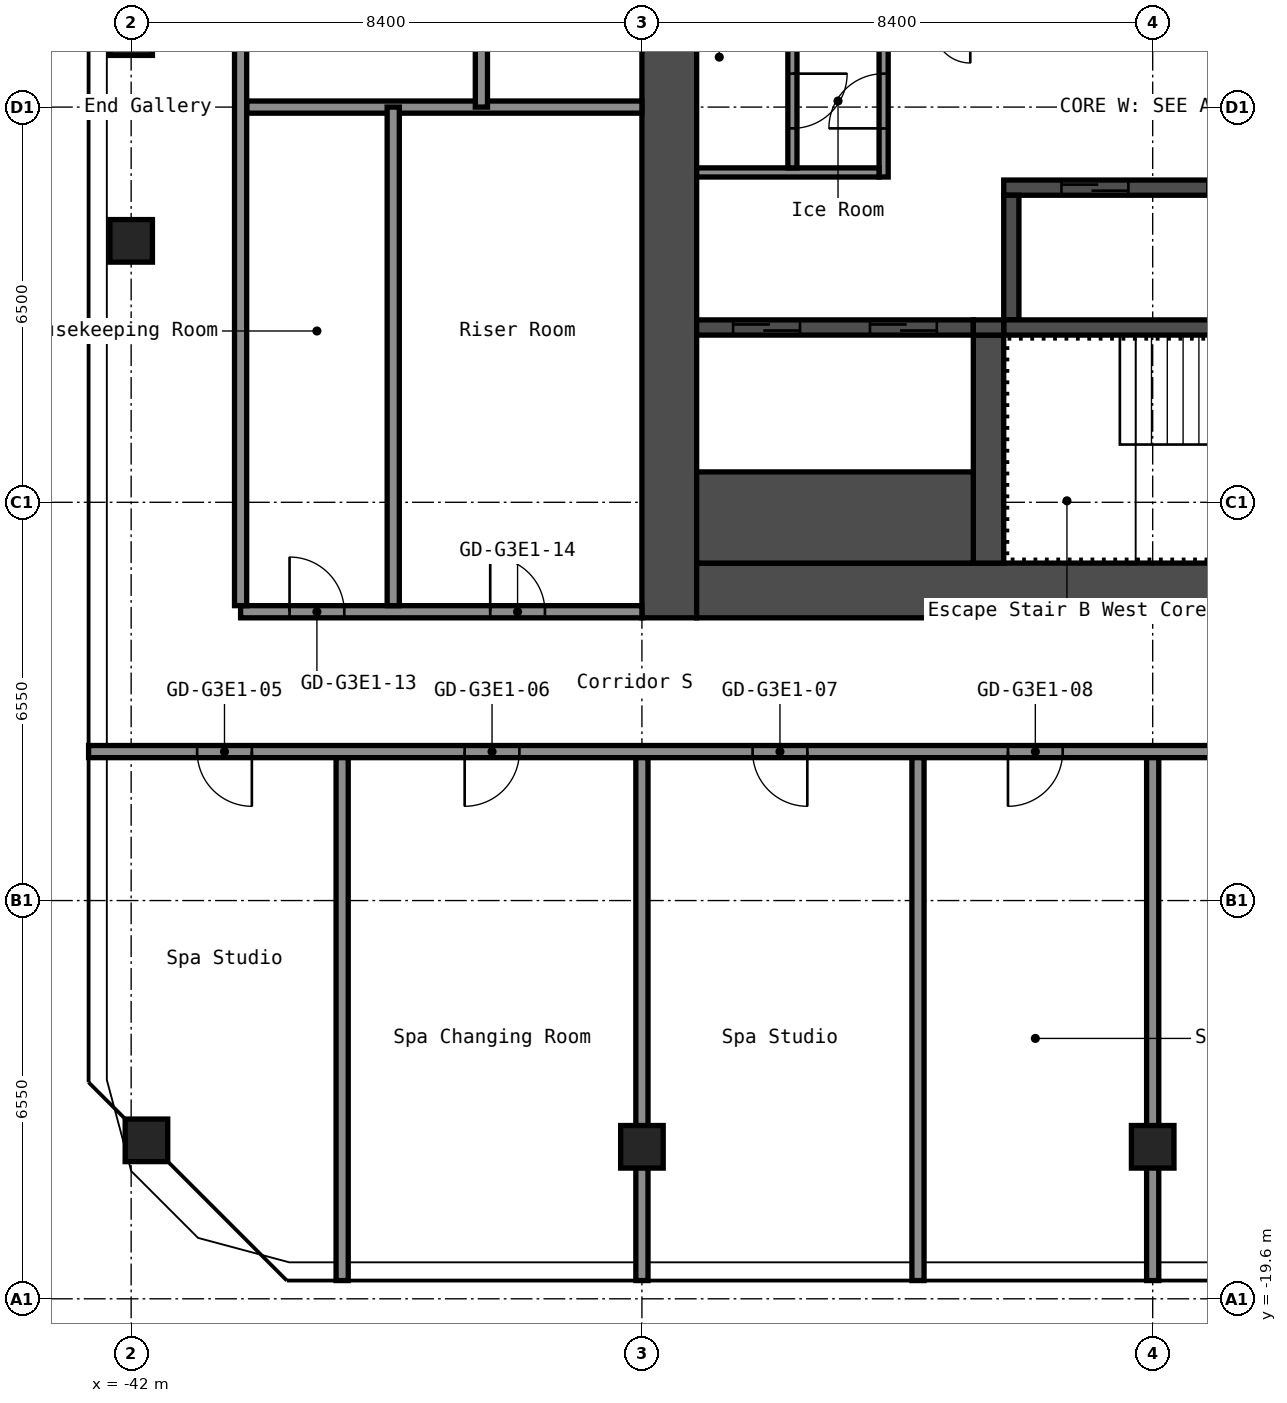
"""IFC4 building model, lengths in metres.
Left out: names, types, materials, properties, quantities, classifications, styles, units other than length and angle.
Written with IfcOpenShell. Run it as: python <this file> out.ifc"""

import sys

from ifc_helpers import new_model, si_unit, direction, frame, frame_2d, origin, origin_2d, place, context, subcontext, project, spatial, rectangle, hollow_rectangle, extrude, element, fill, save


model = new_model("IFC4")
c1 = context("Model", 3, precision=1e-05, world=origin(), true_north=direction((0.0, 1.0)))
c2 = subcontext(c1, "Body", "Model", "MODEL_VIEW")
j1 = project(units=[si_unit("LENGTHUNIT", "METRE"), si_unit("PLANEANGLEUNIT", "RADIAN")], contexts=[c1])
p1 = place(None, origin())
s1 = spatial("IfcSite", under=j1, at=p1, CompositionType="ELEMENT")
p2 = place(p1, origin())
s2 = spatial("IfcBuilding", under=s1, at=p2, CompositionType="ELEMENT")
p3 = place(p2, frame((0.0, 0.0, 159.8)))
s3 = spatial("IfcBuildingStorey", under=s2, at=p3, CompositionType="ELEMENT", Elevation=159.8)
for number, where, z_axis, x_axis in (
    (1, (-41.749, -16.994, 0.0), (0.0, 0.0, 1.0), (1.0, 0.0, 0.0)),
    (2, (-42.0, -2.2, 0.0), (0.0, 0.0, 1.0), (1.0, 0.0, 0.0)),
    (3, (-42.0, 1.2, 0.0), (0.0, 0.0, 1.0), (1.0, 0.0, 0.0)),
    (4, (-33.6, -17.1, 0.0), (0.0, 0.0, 1.0), (1.0, 0.0, 0.0)),
    (5, (-25.2, -17.1, 0.0), (0.0, 0.0, 1.0), (1.0, 0.0, 0.0)),
):
    element("IfcColumn", number, at=place(p3, frame(where, z_axis=z_axis, x_axis=x_axis)), inside=s3, PredefinedType="COLUMN", context=c2, shape_type="SweptSolid", body=[
        extrude(hollow_rectangle(XDim=0.7, YDim=0.7, WallThickness=0.028, at=origin_2d()), origin(), (0.0, 0.0, 1.0), 2.75),
    ])
p4 = place(p3, frame((-33.15, -8.4, 0.0), z_axis=(0.0, 0.0, 1.0), x_axis=(0.0, 1.0, 0.0)))
e6 = element("IfcWall", 6, at=p4, inside=s3, PredefinedType="SHEAR", context=c2, shape_type="SweptSolid", body=[
    extrude(rectangle(XDim=16.8, YDim=0.9, at=frame_2d((8.4, 0.0))), origin(), (0.0, 0.0, 1.0), 2.75),
])
p5 = place(p3, frame((-32.7, -7.95, 0.0), z_axis=(0.0, 0.0, 1.0), x_axis=(1.0, 0.0, 0.0)))
e7 = element("IfcWall", 7, at=p5, inside=s3, PredefinedType="SHEAR", context=c2, shape_type="SweptSolid", body=[
    extrude(rectangle(XDim=15.0, YDim=0.9, at=frame_2d((7.5, 0.0))), origin(), (0.0, 0.0, 1.0), 2.75),
])
p6 = place(p5, frame((11.45, 0.0, 0.0)))
e8 = element("IfcOpeningElement", 8, at=p6, cuts=e7, PredefinedType="OPENING", context=c2, shape_type="SweptSolid", body=[
    extrude(rectangle(XDim=1.0, YDim=2.1, at=frame_2d((0.5, 1.05))), frame((0.0, 0.46, 0.0), z_axis=(0.0, -1.0, 0.0), x_axis=(1.0, 0.0, 0.0)), (0.0, 0.0, 1.0), 0.92),
])
p7 = place(p3, frame((-27.65, -1.325, 0.0), z_axis=(0.0, 0.0, 1.0), x_axis=(1.0, 0.0, 0.0)))
e9 = element("IfcWall", 9, at=p7, inside=s3, PredefinedType="SHEAR", context=c2, shape_type="SweptSolid", body=[
    extrude(rectangle(XDim=7.5, YDim=0.25, at=frame_2d((3.75, 0.0))), origin(), (0.0, 0.0, 1.0), 2.75),
])
p8 = place(p7, frame((5.75, 0.0, 0.0)))
e10 = element("IfcOpeningElement", 10, at=p8, cuts=e9, PredefinedType="OPENING", context=c2, shape_type="SweptSolid", body=[
    extrude(rectangle(XDim=1.1, YDim=2.1, at=frame_2d((0.55, 1.05))), frame((0.0, 0.135, 0.0), z_axis=(0.0, -1.0, 0.0), x_axis=(1.0, 0.0, 0.0)), (0.0, 0.0, 1.0), 0.27),
])
p9 = place(p7, frame((3.35, 0.0, 0.0)))
e11 = element("IfcOpeningElement", 11, at=p9, cuts=e9, PredefinedType="OPENING", context=c2, shape_type="SweptSolid", body=[
    extrude(rectangle(XDim=1.1, YDim=2.1, at=frame_2d((0.55, 1.05))), frame((0.0, 0.135, 0.0), z_axis=(0.0, -1.0, 0.0), x_axis=(1.0, 0.0, 0.0)), (0.0, 0.0, 1.0), 0.27),
])
p10 = place(p7, frame((0.95, 0.0, 0.0)))
e12 = element("IfcOpeningElement", 12, at=p10, cuts=e9, PredefinedType="OPENING", context=c2, shape_type="SweptSolid", body=[
    extrude(rectangle(XDim=1.1, YDim=2.1, at=frame_2d((0.55, 1.05))), frame((0.0, 0.135, 0.0), z_axis=(0.0, -1.0, 0.0), x_axis=(1.0, 0.0, 0.0)), (0.0, 0.0, 1.0), 0.27),
])
p11 = place(p3, frame((-27.525, -3.5, 0.0), z_axis=(0.0, 0.0, 1.0), x_axis=(0.0, 1.0, 0.0)))
e13 = element("IfcWall", 13, at=p11, inside=s3, PredefinedType="SHEAR", context=c2, shape_type="SweptSolid", body=[
    extrude(rectangle(XDim=2.05, YDim=0.25, at=frame_2d((1.025, 0.0))), origin(), (0.0, 0.0, 1.0), 2.75),
])
p12 = place(p3, frame((-27.65, -3.625, 0.0), z_axis=(0.0, 0.0, 1.0), x_axis=(1.0, 0.0, 0.0)))
e14 = element("IfcWall", 14, at=p12, inside=s3, PredefinedType="SHEAR", context=c2, shape_type="SweptSolid", body=[
    extrude(rectangle(XDim=7.5, YDim=0.25, at=frame_2d((3.75, 0.0))), origin(), (0.0, 0.0, 1.0), 2.75),
])
p13 = place(p3, frame((-27.9, -7.5, 0.0), z_axis=(0.0, 0.0, 1.0), x_axis=(0.0, 1.0, 0.0)))
e15 = element("IfcWall", 15, at=p13, inside=s3, PredefinedType="SHEAR", context=c2, shape_type="SweptSolid", body=[
    extrude(rectangle(XDim=3.75, YDim=0.5, at=frame_2d((1.875, 0.0))), origin(), (0.0, 0.0, 1.0), 2.75),
])
p14 = place(p3, frame((-32.7, -3.625, 0.0), z_axis=(0.0, 0.0, 1.0), x_axis=(1.0, 0.0, 0.0)))
e16 = element("IfcWall", 16, at=p14, inside=s3, PredefinedType="SHEAR", context=c2, shape_type="SweptSolid", body=[
    extrude(rectangle(XDim=4.55, YDim=0.25, at=frame_2d((2.275, 0.0))), origin(), (0.0, 0.0, 1.0), 2.75),
])
p15 = place(p14, frame((2.85, 0.0, 0.0)))
e17 = element("IfcOpeningElement", 17, at=p15, cuts=e16, PredefinedType="OPENING", context=c2, shape_type="SweptSolid", body=[
    extrude(rectangle(XDim=1.1, YDim=2.1, at=frame_2d((0.55, 1.05))), frame((0.0, 0.135, 0.0), z_axis=(0.0, -1.0, 0.0), x_axis=(1.0, 0.0, 0.0)), (0.0, 0.0, 1.0), 0.27),
])
p16 = place(p14, frame((0.6, 0.0, 0.0)))
e18 = element("IfcOpeningElement", 18, at=p16, cuts=e16, PredefinedType="OPENING", context=c2, shape_type="SweptSolid", body=[
    extrude(rectangle(XDim=1.1, YDim=2.1, at=frame_2d((0.55, 1.05))), frame((0.0, 0.135, 0.0), z_axis=(0.0, -1.0, 0.0), x_axis=(1.0, 0.0, 0.0)), (0.0, 0.0, 1.0), 0.27),
])
p17 = place(p3, frame((-32.7, -6.75, 0.0), z_axis=(0.0, 0.0, 1.0), x_axis=(1.0, 0.0, 0.0)))
e19 = element("IfcWall", 19, at=p17, inside=s3, PredefinedType="SHEAR", context=c2, shape_type="SweptSolid", body=[
    extrude(rectangle(XDim=4.55, YDim=1.5, at=frame_2d((2.275, 0.0))), origin(), (0.0, 0.0, 1.0), 2.75),
])
p18 = place(p3, frame((-28.15, -3.625, 0.0), z_axis=(0.0, 0.0, 1.0), x_axis=(1.0, 0.0, 0.0)))
e20 = element("IfcWall", 20, at=p18, inside=s3, PredefinedType="SHEAR", context=c2, shape_type="SweptSolid", body=[
    extrude(rectangle(XDim=0.5, YDim=0.25, at=frame_2d((0.25, 0.0))), origin(), (0.0, 0.0, 1.0), 2.75),
])
p19 = place(p3, frame((-29.625, -1.15, 0.0), z_axis=(0.0, 0.0, 1.0), x_axis=(0.0, 1.0, 0.0)))
e21 = element("IfcWall", 21, at=p19, inside=s3, PredefinedType="PARTITIONING", context=c2, shape_type="SweptSolid", body=[
    extrude(rectangle(XDim=2.35, YDim=0.15, at=frame_2d((1.175, 0.0))), origin(), (0.0, 0.0, 1.0), 2.75),
])
p20 = place(p19, frame((0.8, 0.0, 0.0)))
e22 = element("IfcOpeningElement", 22, at=p20, cuts=e21, PredefinedType="OPENING", context=c2, shape_type="SweptSolid", body=[
    extrude(rectangle(XDim=0.9, YDim=2.1, at=frame_2d((0.45, 1.05))), frame((0.0, 0.085, 0.0), z_axis=(0.0, -1.0, 0.0), x_axis=(1.0, 0.0, 0.0)), (0.0, 0.0, 1.0), 0.17),
])
p21 = place(p3, frame((-32.7, -1.075, 0.0), z_axis=(0.0, 0.0, 1.0), x_axis=(1.0, 0.0, 0.0)))
e23 = element("IfcWall", 23, at=p21, inside=s3, PredefinedType="PARTITIONING", context=c2, shape_type="SweptSolid", body=[
    extrude(rectangle(XDim=3.0, YDim=0.15, at=frame_2d((1.5, 0.0))), origin(), (0.0, 0.0, 1.0), 2.75),
])
p22 = place(p3, frame((-31.125, -1.0, 0.0), z_axis=(0.0, 0.0, 1.0), x_axis=(0.0, 1.0, 0.0)))
e24 = element("IfcWall", 24, at=p22, inside=s3, PredefinedType="PARTITIONING", context=c2, shape_type="SweptSolid", body=[
    extrude(rectangle(XDim=2.2, YDim=0.15, at=frame_2d((1.1, 0.0))), origin(), (0.0, 0.0, 1.0), 2.75),
])
p23 = place(p22, frame((0.65, 0.0, 0.0)))
e25 = element("IfcOpeningElement", 25, at=p23, cuts=e24, PredefinedType="OPENING", context=c2, shape_type="SweptSolid", body=[
    extrude(rectangle(XDim=0.9, YDim=2.1, at=frame_2d((0.45, 1.05))), frame((0.0, 0.085, 0.0), z_axis=(0.0, -1.0, 0.0), x_axis=(1.0, 0.0, 0.0)), (0.0, 0.0, 1.0), 0.17),
])
p24 = place(p3, frame((-42.7, -10.6, 0.0), z_axis=(0.0, 0.0, 1.0), x_axis=(1.0, 0.0, 0.0)))
e26 = element("IfcWall", 26, at=p24, inside=s3, PredefinedType="PARTITIONING", context=c2, shape_type="SweptSolid", body=[
    extrude(rectangle(XDim=25.9, YDim=0.2, at=frame_2d((12.95, 0.0))), origin(), (0.0, 0.0, 1.0), 2.75),
])
p25 = place(p24, frame((1.785, 0.0, 0.0)))
e27 = element("IfcOpeningElement", 27, at=p25, cuts=e26, PredefinedType="OPENING", context=c2, shape_type="SweptSolid", body=[
    extrude(rectangle(XDim=0.9, YDim=2.1, at=frame_2d((0.45, 1.05))), frame((0.0, 0.11, 0.0), z_axis=(0.0, -1.0, 0.0), x_axis=(1.0, 0.0, 0.0)), (0.0, 0.0, 1.0), 0.22),
])
p26 = place(p24, frame((6.185, 0.0, 0.0)))
e28 = element("IfcOpeningElement", 28, at=p26, cuts=e26, PredefinedType="OPENING", context=c2, shape_type="SweptSolid", body=[
    extrude(rectangle(XDim=0.9, YDim=2.1, at=frame_2d((0.45, 1.05))), frame((0.0, 0.11, 0.0), z_axis=(0.0, -1.0, 0.0), x_axis=(1.0, 0.0, 0.0)), (0.0, 0.0, 1.0), 0.22),
])
p27 = place(p24, frame((10.92, 0.0, 0.0)))
e29 = element("IfcOpeningElement", 29, at=p27, cuts=e26, PredefinedType="OPENING", context=c2, shape_type="SweptSolid", body=[
    extrude(rectangle(XDim=0.9, YDim=2.1, at=frame_2d((0.45, 1.05))), frame((0.0, 0.11, 0.0), z_axis=(0.0, -1.0, 0.0), x_axis=(1.0, 0.0, 0.0)), (0.0, 0.0, 1.0), 0.22),
])
p28 = place(p24, frame((15.12, 0.0, 0.0)))
e30 = element("IfcOpeningElement", 30, at=p28, cuts=e26, PredefinedType="OPENING", context=c2, shape_type="SweptSolid", body=[
    extrude(rectangle(XDim=0.9, YDim=2.1, at=frame_2d((0.45, 1.05))), frame((0.0, 0.11, 0.0), z_axis=(0.0, -1.0, 0.0), x_axis=(1.0, 0.0, 0.0)), (0.0, 0.0, 1.0), 0.22),
])
p29 = place(p24, frame((21.2, 0.0, 0.0)))
e31 = element("IfcOpeningElement", 31, at=p29, cuts=e26, PredefinedType="OPENING", context=c2, shape_type="SweptSolid", body=[
    extrude(rectangle(XDim=1.0, YDim=2.1, at=frame_2d((0.5, 1.05))), frame((0.0, 0.11, 0.0), z_axis=(0.0, -1.0, 0.0), x_axis=(1.0, 0.0, 0.0)), (0.0, 0.0, 1.0), 0.22),
])
p30 = place(p3, frame((-40.2, -8.3, 0.0), z_axis=(0.0, 0.0, 1.0), x_axis=(1.0, 0.0, 0.0)))
e32 = element("IfcWall", 32, at=p30, inside=s3, PredefinedType="PARTITIONING", context=c2, shape_type="SweptSolid", body=[
    extrude(rectangle(XDim=6.6, YDim=0.2, at=frame_2d((3.3, 0.0))), origin(), (0.0, 0.0, 1.0), 2.75),
])
p31 = place(p30, frame((0.805, 0.0, 0.0)))
e33 = element("IfcOpeningElement", 33, at=p31, cuts=e32, PredefinedType="OPENING", context=c2, shape_type="SweptSolid", body=[
    extrude(rectangle(XDim=0.9, YDim=2.1, at=frame_2d((0.45, 1.05))), frame((0.0, 0.11, 0.0), z_axis=(0.0, -1.0, 0.0), x_axis=(1.0, 0.0, 0.0)), (0.0, 0.0, 1.0), 0.22),
])
p32 = place(p30, frame((4.105, 0.0, 0.0)))
e34 = element("IfcOpeningElement", 34, at=p32, cuts=e32, PredefinedType="OPENING", context=c2, shape_type="SweptSolid", body=[
    extrude(rectangle(XDim=0.9, YDim=2.1, at=frame_2d((0.45, 1.05))), frame((0.0, 0.11, 0.0), z_axis=(0.0, -1.0, 0.0), x_axis=(1.0, 0.0, 0.0)), (0.0, 0.0, 1.0), 0.22),
])
p33 = place(p3, frame((-40.1, 0.0, 0.0), z_axis=(0.0, 0.0, 1.0), x_axis=(1.0, 0.0, 0.0)))
e35 = element("IfcWall", 35, at=p33, inside=s3, PredefinedType="PARTITIONING", context=c2, shape_type="SweptSolid", body=[
    extrude(rectangle(XDim=6.5, YDim=0.2, at=frame_2d((3.25, 0.0))), origin(), (0.0, 0.0, 1.0), 2.75),
])
p34 = place(p3, frame((-40.2, -8.2, 0.0), z_axis=(0.0, 0.0, 1.0), x_axis=(0.0, 1.0, 0.0)))
e36 = element("IfcWall", 36, at=p34, inside=s3, PredefinedType="PARTITIONING", context=c2, shape_type="SweptSolid", body=[
    extrude(rectangle(XDim=16.4, YDim=0.2, at=frame_2d((8.2, 0.0))), origin(), (0.0, 0.0, 1.0), 2.75),
])
p35 = place(p3, frame((-38.53, -19.3, 0.0), z_axis=(0.0, 0.0, 1.0), x_axis=(0.0, 1.0, 0.0)))
e37 = element("IfcWall", 37, at=p35, inside=s3, PredefinedType="PARTITIONING", context=c2, shape_type="SweptSolid", body=[
    extrude(rectangle(XDim=8.6, YDim=0.2, at=frame_2d((4.3, 0.0))), origin(), (0.0, 0.0, 1.0), 2.75),
])
for number, where, z_axis, x_axis in (
    (38, (-37.69, -8.2, 0.0), (0.0, 0.0, 1.0), (0.0, 1.0, 0.0)),
    (39, (-36.24, 0.0, 0.0), (0.0, 0.0, 1.0), (0.0, 1.0, 0.0)),
):
    element("IfcWall", number, at=place(p3, frame(where, z_axis=z_axis, x_axis=x_axis)), inside=s3, PredefinedType="PARTITIONING", context=c2, shape_type="SweptSolid", body=[
        extrude(rectangle(XDim=8.2, YDim=0.2, at=frame_2d((4.1, 0.0))), origin(), (0.0, 0.0, 1.0), 2.75),
    ])
for number, where, z_axis, x_axis in (
    (40, (-33.6, -19.3, 0.0), (0.0, 0.0, 1.0), (0.0, 1.0, 0.0)),
    (41, (-29.06, -19.3, 0.0), (0.0, 0.0, 1.0), (0.0, 1.0, 0.0)),
    (42, (-25.2, -19.3, 0.0), (0.0, 0.0, 1.0), (0.0, 1.0, 0.0)),
):
    element("IfcWall", number, at=place(p3, frame(where, z_axis=z_axis, x_axis=x_axis)), inside=s3, PredefinedType="PARTITIONING", context=c2, shape_type="SweptSolid", body=[
        extrude(rectangle(XDim=8.6, YDim=0.2, at=frame_2d((4.3, 0.0))), origin(), (0.0, 0.0, 1.0), 2.75),
    ])
p36 = place(p20, origin())
e43 = element("IfcDoor", 43, at=p36, inside=s3, OperationType="SINGLE_SWING_RIGHT", PredefinedType="DOOR", context=c2, shape_type="SweptSolid", body=[
    extrude(rectangle(XDim=0.9, YDim=2.1, at=frame_2d((0.45, 1.05))), frame((0.0, 0.025, 0.0), z_axis=(0.0, -1.0, 0.0), x_axis=(1.0, 0.0, 0.0)), (0.0, 0.0, 1.0), 0.05),
])
fill(e22, e43)
p37 = place(p23, origin())
e44 = element("IfcDoor", 44, at=p37, inside=s3, OperationType="SINGLE_SWING_RIGHT", PredefinedType="DOOR", context=c2, shape_type="SweptSolid", body=[
    extrude(rectangle(XDim=0.9, YDim=2.1, at=frame_2d((0.45, 1.05))), frame((0.0, 0.025, 0.0), z_axis=(0.0, -1.0, 0.0), x_axis=(1.0, 0.0, 0.0)), (0.0, 0.0, 1.0), 0.05),
])
fill(e25, e44)
p38 = place(p10, origin())
e45 = element("IfcDoor", 45, at=p38, inside=s3, OperationType="DOUBLE_DOOR_SLIDING", PredefinedType="DOOR", context=c2, shape_type="SweptSolid", body=[
    extrude(rectangle(XDim=1.1, YDim=2.1, at=frame_2d((0.55, 1.05))), frame((0.0, 0.025, 0.0), z_axis=(0.0, -1.0, 0.0), x_axis=(1.0, 0.0, 0.0)), (0.0, 0.0, 1.0), 0.05),
])
fill(e12, e45)
p39 = place(p15, origin())
e46 = element("IfcDoor", 46, at=p39, inside=s3, OperationType="DOUBLE_DOOR_SLIDING", PredefinedType="DOOR", context=c2, shape_type="SweptSolid", body=[
    extrude(rectangle(XDim=1.1, YDim=2.1, at=frame_2d((0.55, 1.05))), frame((0.0, 0.025, 0.0), z_axis=(0.0, -1.0, 0.0), x_axis=(1.0, 0.0, 0.0)), (0.0, 0.0, 1.0), 0.05),
])
fill(e17, e46)
p40 = place(p16, origin())
e47 = element("IfcDoor", 47, at=p40, inside=s3, OperationType="DOUBLE_DOOR_SLIDING", PredefinedType="DOOR", context=c2, shape_type="SweptSolid", body=[
    extrude(rectangle(XDim=1.1, YDim=2.1, at=frame_2d((0.55, 1.05))), frame((0.0, 0.025, 0.0), z_axis=(0.0, -1.0, 0.0), x_axis=(1.0, 0.0, 0.0)), (0.0, 0.0, 1.0), 0.05),
])
fill(e18, e47)
p41 = place(p25, origin())
e48 = element("IfcDoor", 48, at=p41, inside=s3, OperationType="SINGLE_SWING_RIGHT", PredefinedType="DOOR", context=c2, shape_type="SweptSolid", body=[
    extrude(rectangle(XDim=0.9, YDim=2.1, at=frame_2d((0.45, 1.05))), frame((0.0, 0.025, 0.0), z_axis=(0.0, -1.0, 0.0), x_axis=(1.0, 0.0, 0.0)), (0.0, 0.0, 1.0), 0.05),
])
fill(e27, e48)
p42 = place(p26, origin())
e49 = element("IfcDoor", 49, at=p42, inside=s3, OperationType="SINGLE_SWING_LEFT", PredefinedType="DOOR", context=c2, shape_type="SweptSolid", body=[
    extrude(rectangle(XDim=0.9, YDim=2.1, at=frame_2d((0.45, 1.05))), frame((0.0, 0.025, 0.0), z_axis=(0.0, -1.0, 0.0), x_axis=(1.0, 0.0, 0.0)), (0.0, 0.0, 1.0), 0.05),
])
fill(e28, e49)
p43 = place(p27, origin())
e50 = element("IfcDoor", 50, at=p43, inside=s3, OperationType="SINGLE_SWING_RIGHT", PredefinedType="DOOR", context=c2, shape_type="SweptSolid", body=[
    extrude(rectangle(XDim=0.9, YDim=2.1, at=frame_2d((0.45, 1.05))), frame((0.0, 0.025, 0.0), z_axis=(0.0, -1.0, 0.0), x_axis=(1.0, 0.0, 0.0)), (0.0, 0.0, 1.0), 0.05),
])
fill(e29, e50)
p44 = place(p28, origin())
e51 = element("IfcDoor", 51, at=p44, inside=s3, OperationType="SINGLE_SWING_LEFT", PredefinedType="DOOR", context=c2, shape_type="SweptSolid", body=[
    extrude(rectangle(XDim=0.9, YDim=2.1, at=frame_2d((0.45, 1.05))), frame((0.0, 0.025, 0.0), z_axis=(0.0, -1.0, 0.0), x_axis=(1.0, 0.0, 0.0)), (0.0, 0.0, 1.0), 0.05),
])
fill(e30, e51)
p45 = place(p31, origin())
e52 = element("IfcDoor", 52, at=p45, inside=s3, OperationType="SINGLE_SWING_RIGHT", PredefinedType="DOOR", context=c2, shape_type="SweptSolid", body=[
    extrude(rectangle(XDim=0.9, YDim=2.1, at=frame_2d((0.45, 1.05))), frame((0.0, 0.025, 0.0), z_axis=(0.0, -1.0, 0.0), x_axis=(1.0, 0.0, 0.0)), (0.0, 0.0, 1.0), 0.05),
])
fill(e33, e52)
p46 = place(p32, origin())
e53 = element("IfcDoor", 53, at=p46, inside=s3, OperationType="SINGLE_SWING_RIGHT", PredefinedType="DOOR", context=c2, shape_type="SweptSolid", body=[
    extrude(rectangle(XDim=0.9, YDim=2.1, at=frame_2d((0.45, 1.05))), frame((0.0, 0.025, 0.0), z_axis=(0.0, -1.0, 0.0), x_axis=(1.0, 0.0, 0.0)), (0.0, 0.0, 1.0), 0.05),
])
fill(e34, e53)
save(model, sys.argv[1])
